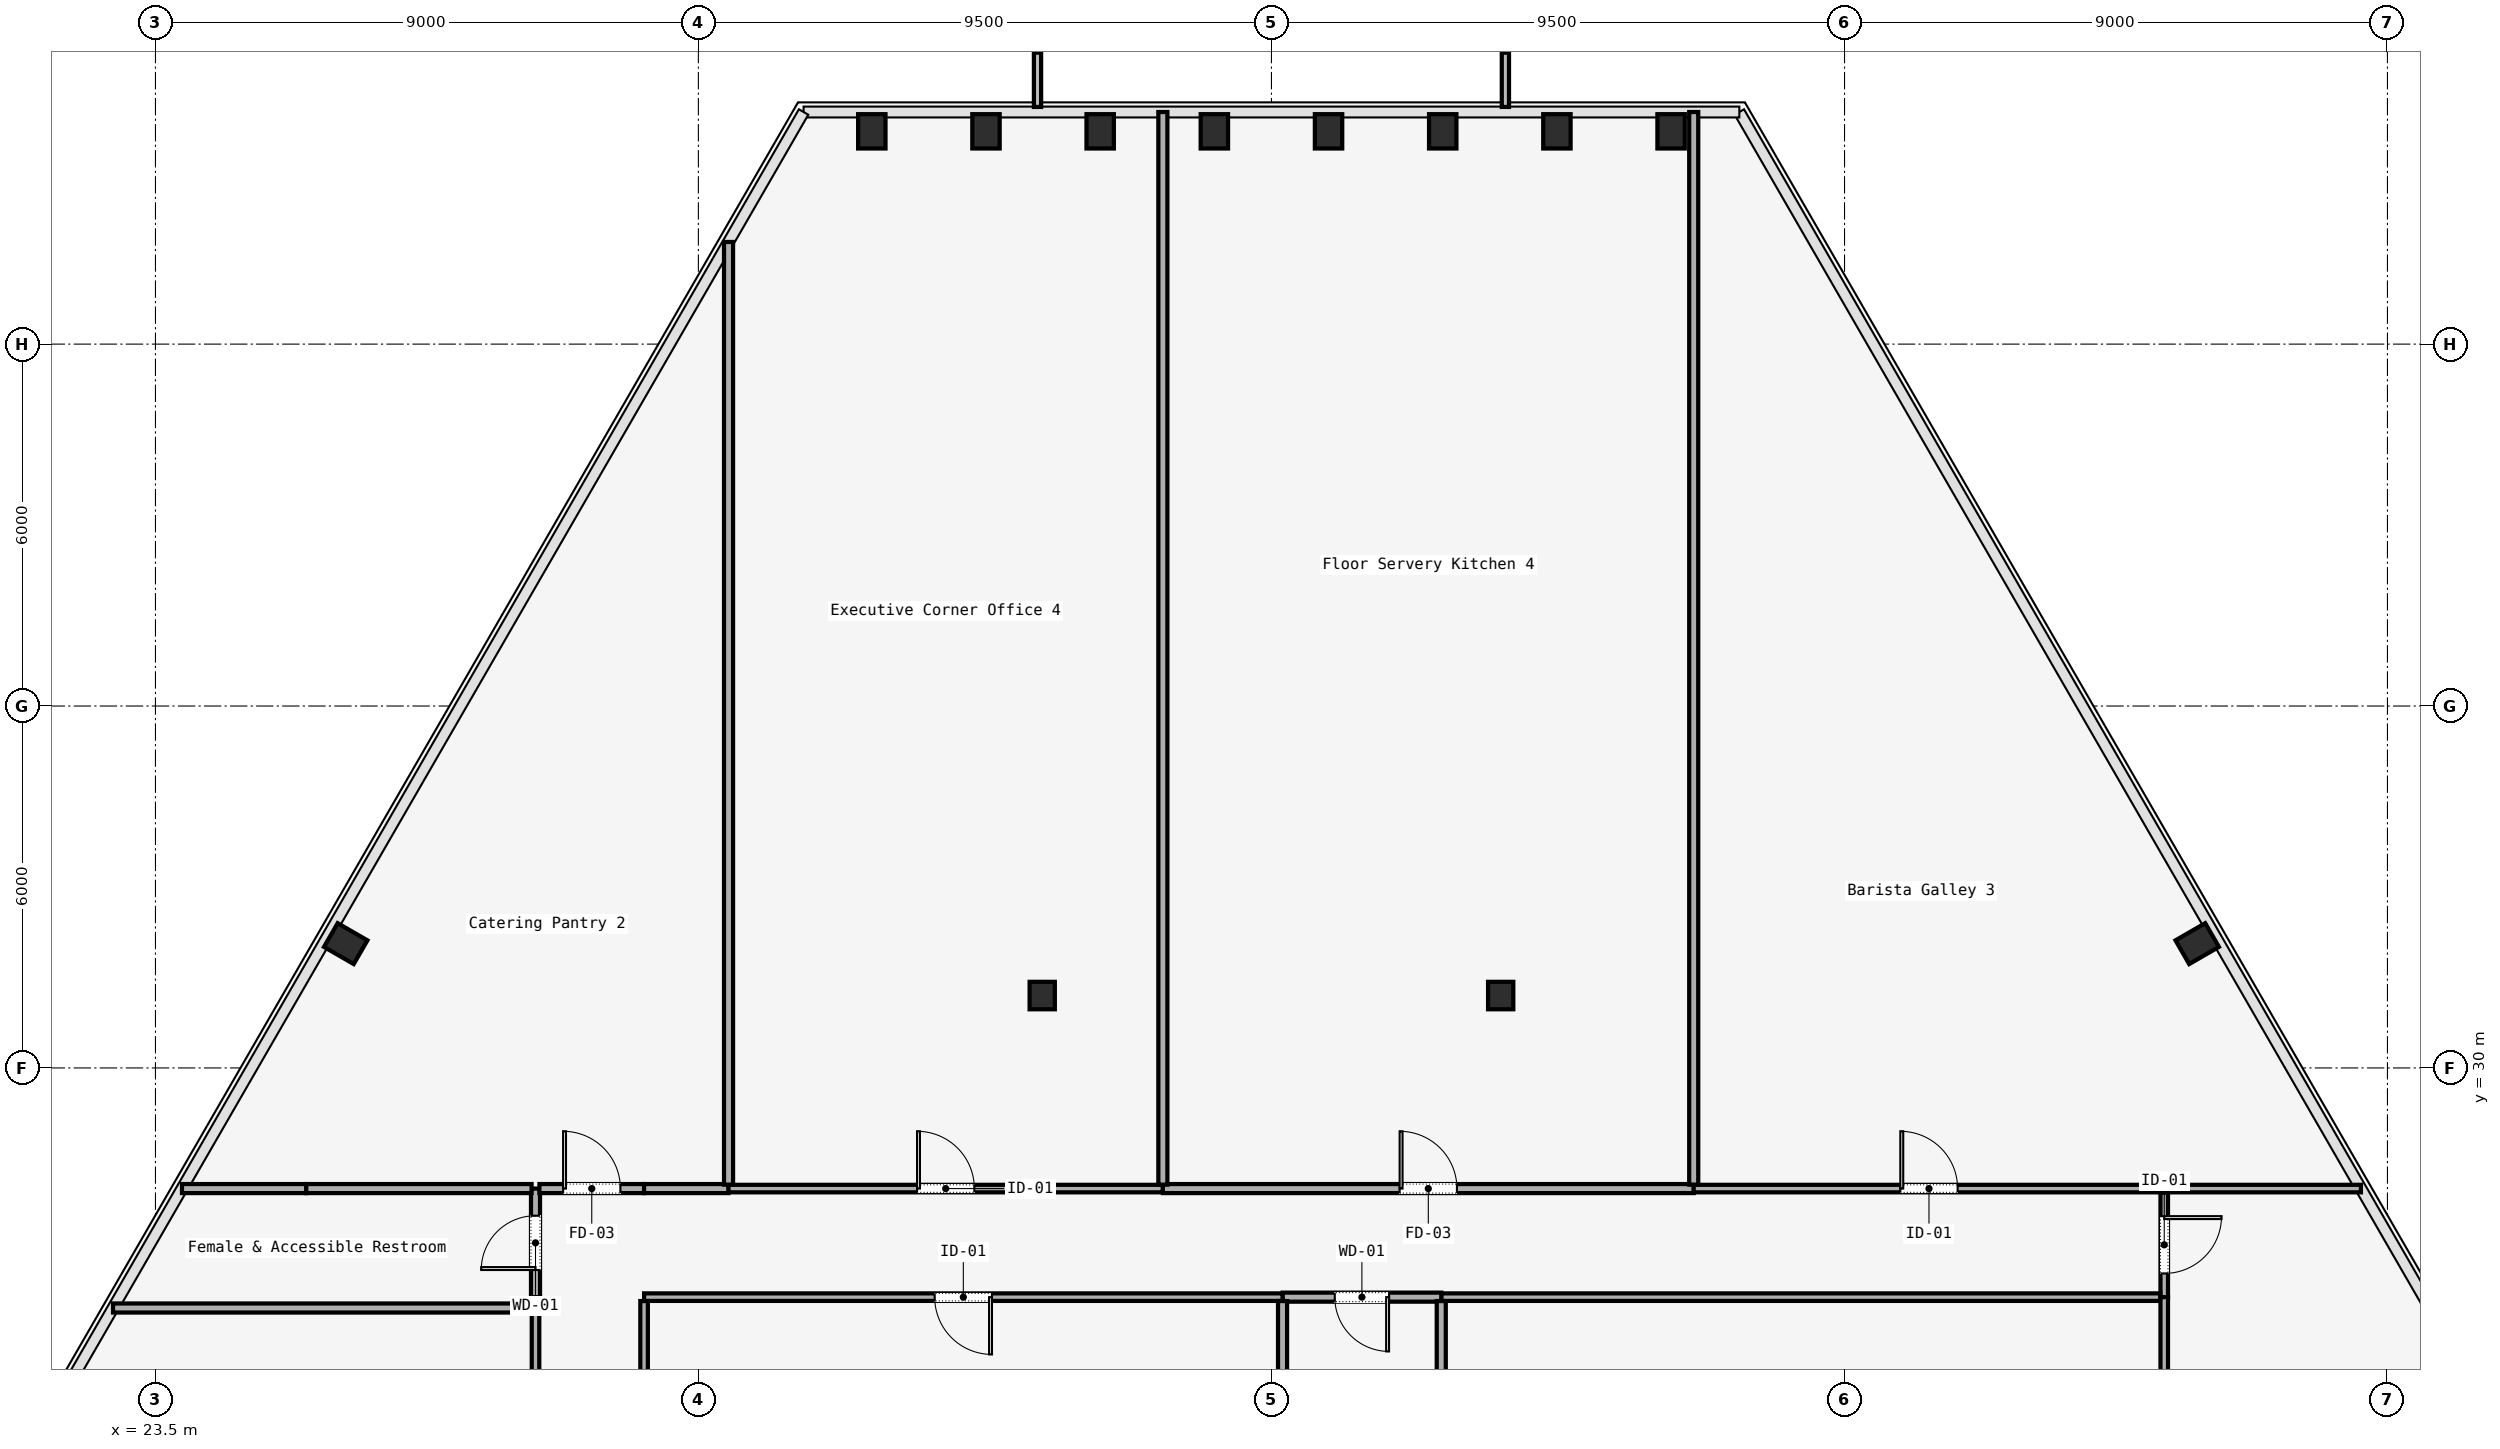
"""IFC4 building model, lengths in metres.
Left out: names, types, materials, properties, quantities, classifications, styles, units other than length and angle.
Written with IfcOpenShell. Run it as: python <this file> out.ifc"""

import sys

from ifc_helpers import new_model, si_unit, direction, frame, frame_2d, origin, origin_2d, place, context, subcontext, project, spatial, rectangle, i_section, extrude, element, fill, save


model = new_model("IFC4")
c1 = context("Model", 3, precision=1e-05, world=origin(), true_north=direction((0.0, 1.0)))
c2 = subcontext(c1, "Body", "Model", "MODEL_VIEW")
j1 = project(units=[si_unit("LENGTHUNIT", "METRE"), si_unit("PLANEANGLEUNIT", "RADIAN")], contexts=[c1])
p1 = place(None, origin())
s1 = spatial("IfcSite", under=j1, at=p1, CompositionType="ELEMENT")
p2 = place(p1, origin())
s2 = spatial("IfcBuilding", under=s1, at=p2, CompositionType="ELEMENT")
p3 = place(p2, frame((0.0, 0.0, 62.6)))
s3 = spatial("IfcBuildingStorey", under=s2, at=p3, CompositionType="ELEMENT", Elevation=62.6)
for number, where, z_axis, x_axis in (
    (1, (38.2, 31.2, 0.0), (0.0, 0.0, 1.0), (1.0, 0.0, 0.0)),
    (2, (45.8, 31.2, 0.0), (0.0, 0.0, 1.0), (1.0, 0.0, 0.0)),
):
    element("IfcColumn", number, at=place(p3, frame(where, z_axis=z_axis, x_axis=x_axis)), inside=s3, PredefinedType="COLUMN", context=c2, shape_type="SweptSolid", body=[
        extrude(i_section(OverallWidth=0.418, OverallDepth=0.456, WebThickness=0.042, FlangeThickness=0.067, FilletRadius=0.015, at=origin_2d()), origin(), (0.0, 0.0, 1.0), 3.58),
    ])
for number, where, z_axis, x_axis in (
    (3, (57.346, 32.061, 0.0), (0.0, 0.0, 1.0), (-0.5, 0.866, 0.0)),
    (4, (48.625, 45.528, 0.0), (0.0, 0.0, 1.0), (1.0, 0.0, 0.0)),
    (5, (46.732, 45.528, 0.0), (0.0, 0.0, 1.0), (1.0, 0.0, 0.0)),
    (6, (44.839, 45.528, 0.0), (0.0, 0.0, 1.0), (1.0, 0.0, 0.0)),
    (7, (42.946, 45.528, 0.0), (0.0, 0.0, 1.0), (1.0, 0.0, 0.0)),
    (8, (41.054, 45.528, 0.0), (0.0, 0.0, 1.0), (1.0, 0.0, 0.0)),
    (9, (39.161, 45.528, 0.0), (0.0, 0.0, 1.0), (1.0, 0.0, 0.0)),
    (10, (37.268, 45.528, 0.0), (0.0, 0.0, 1.0), (1.0, 0.0, 0.0)),
    (11, (35.375, 45.528, 0.0), (0.0, 0.0, 1.0), (1.0, 0.0, 0.0)),
    (12, (26.654, 32.061, 0.0), (0.0, 0.0, 1.0), (0.5, 0.866, 0.0)),
):
    element("IfcColumn", number, at=place(p3, frame(where, z_axis=z_axis, x_axis=x_axis)), inside=s3, PredefinedType="COLUMN", context=c2, shape_type="SweptSolid", body=[
        extrude(i_section(OverallWidth=0.454, OverallDepth=0.569, WebThickness=0.078, FlangeThickness=0.08, FilletRadius=0.015, at=origin_2d()), origin(), (0.0, 0.0, 1.0), 3.58),
    ])
p4 = place(p3, frame((29.8, 17.065, 0.0), z_axis=(0.0, 0.0, 1.0), x_axis=(0.0, 1.0, 0.0)))
e13 = element("IfcWall", 13, at=p4, inside=s3, PredefinedType="PARTITIONING", context=c2, shape_type="SweptSolid", body=[
    extrude(rectangle(XDim=8.955, YDim=0.125, at=frame_2d((4.478, 0.0))), origin(), (0.0, 0.0, 1.0), 2.933),
])
p5 = place(p4, frame((3.778, 0.0, 0.0)))
e14 = element("IfcOpeningElement", 14, at=p5, cuts=e13, PredefinedType="OPENING", context=c2, shape_type="SweptSolid", body=[
    extrude(rectangle(XDim=1.4, YDim=2.2, at=frame_2d((0.7, 1.1))), frame((0.0, 0.062, 0.0), z_axis=(0.0, -1.0, 0.0), x_axis=(1.0, 0.0, 0.0)), (0.0, 0.0, 1.0), 0.125),
])
p6 = place(p3, frame((29.8, 26.2, 0.0), z_axis=(0.0, 0.0, 1.0), x_axis=(0.0, 1.0, 0.0)))
e15 = element("IfcWall", 15, at=p6, inside=s3, PredefinedType="PARTITIONING", context=c2, shape_type="SweptSolid", body=[
    extrude(rectangle(XDim=1.8, YDim=0.15, at=frame_2d((0.9, 0.0))), origin(), (0.0, 0.0, 1.0), 2.933),
])
p7 = place(p6, frame((0.45, 0.0, 0.0)))
e16 = element("IfcOpeningElement", 16, at=p7, cuts=e15, PredefinedType="OPENING", context=c2, shape_type="SweptSolid", body=[
    extrude(rectangle(XDim=0.9, YDim=2.15, at=frame_2d((0.45, 1.075))), frame((0.0, 0.075, 0.0), z_axis=(0.0, -1.0, 0.0), x_axis=(1.0, 0.0, 0.0)), (0.0, 0.0, 1.0), 0.15),
])
p8 = place(p3, frame((29.865, 28.0, 0.0), z_axis=(0.0, 0.0, 1.0), x_axis=(1.0, 0.0, 0.0)))
e17 = element("IfcWall", 17, at=p8, inside=s3, PredefinedType="PARTITIONING", context=c2, shape_type="SweptSolid", body=[
    extrude(rectangle(XDim=1.735, YDim=0.15, at=frame_2d((0.868, 0.0))), origin(), (0.0, 0.0, 1.0), 2.933),
])
p9 = place(p8, frame((0.393, 0.0, 0.0)))
e18 = element("IfcOpeningElement", 18, at=p9, cuts=e17, PredefinedType="OPENING", context=c2, shape_type="SweptSolid", body=[
    extrude(rectangle(XDim=0.95, YDim=2.2, at=frame_2d((0.475, 1.1))), frame((0.0, 0.075, 0.0), z_axis=(0.0, -1.0, 0.0), x_axis=(1.0, 0.0, 0.0)), (0.0, 0.0, 1.0), 0.15),
])
p10 = place(p3, frame((31.6, 28.0, 0.0), z_axis=(0.0, 0.0, 1.0), x_axis=(1.0, 0.0, 0.0)))
e19 = element("IfcWall", 19, at=p10, inside=s3, PredefinedType="PARTITIONING", context=c2, shape_type="SweptSolid", body=[
    extrude(rectangle(XDim=1.4, YDim=0.15, at=frame_2d((0.7, 0.0))), origin(), (0.0, 0.0, 1.0), 2.933),
])
p11 = place(p3, frame((33.0, 28.0, 0.0), z_axis=(0.0, 0.0, 1.0), x_axis=(1.0, 0.0, 0.0)))
e20 = element("IfcWall", 20, at=p11, inside=s3, PredefinedType="PARTITIONING", context=c2, shape_type="SweptSolid", body=[
    extrude(rectangle(XDim=7.2, YDim=0.125, at=frame_2d((3.6, 0.0))), origin(), (0.0, 0.0, 1.0), 2.933),
])
p12 = place(p11, frame((3.125, 0.0, 0.0)))
e21 = element("IfcOpeningElement", 21, at=p12, cuts=e20, PredefinedType="OPENING", context=c2, shape_type="SweptSolid", body=[
    extrude(rectangle(XDim=0.95, YDim=2.2, at=frame_2d((0.475, 1.1))), frame((0.0, 0.062, 0.0), z_axis=(0.0, -1.0, 0.0), x_axis=(1.0, 0.0, 0.0)), (0.0, 0.0, 1.0), 0.125),
])
p13 = place(p3, frame((40.2, 28.0, 0.0), z_axis=(0.0, 0.0, 1.0), x_axis=(1.0, 0.0, 0.0)))
e22 = element("IfcWall", 22, at=p13, inside=s3, PredefinedType="PARTITIONING", context=c2, shape_type="SweptSolid", body=[
    extrude(rectangle(XDim=8.8, YDim=0.15, at=frame_2d((4.4, 0.0))), origin(), (0.0, 0.0, 1.0), 2.933),
])
p14 = place(p13, frame((3.925, 0.0, 0.0)))
e23 = element("IfcOpeningElement", 23, at=p14, cuts=e22, PredefinedType="OPENING", context=c2, shape_type="SweptSolid", body=[
    extrude(rectangle(XDim=0.95, YDim=2.2, at=frame_2d((0.475, 1.1))), frame((0.0, 0.075, 0.0), z_axis=(0.0, -1.0, 0.0), x_axis=(1.0, 0.0, 0.0)), (0.0, 0.0, 1.0), 0.15),
])
p15 = place(p3, frame((49.0, 28.0, 0.0), z_axis=(0.0, 0.0, 1.0), x_axis=(1.0, 0.0, 0.0)))
e24 = element("IfcWall", 24, at=p15, inside=s3, PredefinedType="PARTITIONING", context=c2, shape_type="SweptSolid", body=[
    extrude(rectangle(XDim=7.8, YDim=0.125, at=frame_2d((3.9, 0.0))), origin(), (0.0, 0.0, 1.0), 2.933),
])
p16 = place(p15, frame((3.425, 0.0, 0.0)))
e25 = element("IfcOpeningElement", 25, at=p16, cuts=e24, PredefinedType="OPENING", context=c2, shape_type="SweptSolid", body=[
    extrude(rectangle(XDim=0.95, YDim=2.2, at=frame_2d((0.475, 1.1))), frame((0.0, 0.062, 0.0), z_axis=(0.0, -1.0, 0.0), x_axis=(1.0, 0.0, 0.0)), (0.0, 0.0, 1.0), 0.125),
])
p17 = place(p3, frame((56.8, 27.935, 0.0), z_axis=(0.0, 0.0, 1.0), x_axis=(0.0, -1.0, 0.0)))
e26 = element("IfcWall", 26, at=p17, inside=s3, PredefinedType="PARTITIONING", context=c2, shape_type="SweptSolid", body=[
    extrude(rectangle(XDim=1.735, YDim=0.125, at=frame_2d((0.868, 0.0))), origin(), (0.0, 0.0, 1.0), 2.933),
])
p18 = place(p17, frame((0.393, 0.0, 0.0)))
e27 = element("IfcOpeningElement", 27, at=p18, cuts=e26, PredefinedType="OPENING", context=c2, shape_type="SweptSolid", body=[
    extrude(rectangle(XDim=0.95, YDim=2.2, at=frame_2d((0.475, 1.1))), frame((0.0, 0.062, 0.0), z_axis=(0.0, -1.0, 0.0), x_axis=(1.0, 0.0, 0.0)), (0.0, 0.0, 1.0), 0.125),
])
p19 = place(p3, frame((56.735, 26.2, 0.0), z_axis=(0.0, 0.0, 1.0), x_axis=(-1.0, 0.0, 0.0)))
e28 = element("IfcWall", 28, at=p19, inside=s3, PredefinedType="PARTITIONING", context=c2, shape_type="SweptSolid", body=[
    extrude(rectangle(XDim=11.92, YDim=0.125, at=frame_2d((5.96, 0.0))), origin(), (0.0, 0.0, 1.0), 2.933),
])
p20 = place(p3, frame((44.815, 26.2, 0.0), z_axis=(0.0, 0.0, 1.0), x_axis=(-1.0, 0.0, 0.0)))
e29 = element("IfcWall", 29, at=p20, inside=s3, PredefinedType="PARTITIONING", context=c2, shape_type="SweptSolid", body=[
    extrude(rectangle(XDim=2.631, YDim=0.15, at=frame_2d((1.315, 0.0))), origin(), (0.0, 0.0, 1.0), 2.933),
])
p21 = place(p20, frame((0.865, 0.0, 0.0)))
e30 = element("IfcOpeningElement", 30, at=p21, cuts=e29, PredefinedType="OPENING", context=c2, shape_type="SweptSolid", body=[
    extrude(rectangle(XDim=0.9, YDim=2.15, at=frame_2d((0.45, 1.075))), frame((0.0, 0.075, 0.0), z_axis=(0.0, -1.0, 0.0), x_axis=(1.0, 0.0, 0.0)), (0.0, 0.0, 1.0), 0.15),
])
p22 = place(p3, frame((42.184, 26.2, 0.0), z_axis=(0.0, 0.0, 1.0), x_axis=(-1.0, 0.0, 0.0)))
e31 = element("IfcWall", 31, at=p22, inside=s3, PredefinedType="PARTITIONING", context=c2, shape_type="SweptSolid", body=[
    extrude(rectangle(XDim=10.584, YDim=0.125, at=frame_2d((5.292, 0.0))), origin(), (0.0, 0.0, 1.0), 2.933),
])
p23 = place(p22, frame((4.817, 0.0, 0.0)))
e32 = element("IfcOpeningElement", 32, at=p23, cuts=e31, PredefinedType="OPENING", context=c2, shape_type="SweptSolid", body=[
    extrude(rectangle(XDim=0.95, YDim=2.2, at=frame_2d((0.475, 1.1))), frame((0.0, 0.062, 0.0), z_axis=(0.0, -1.0, 0.0), x_axis=(1.0, 0.0, 0.0)), (0.0, 0.0, 1.0), 0.125),
])
p24 = place(p3, frame((31.6, 26.135, 0.0), z_axis=(0.0, 0.0, 1.0), x_axis=(0.0, -1.0, 0.0)))
e33 = element("IfcWall", 33, at=p24, inside=s3, PredefinedType="PARTITIONING", context=c2, shape_type="SweptSolid", body=[
    extrude(rectangle(XDim=9.135, YDim=0.125, at=frame_2d((4.567, 0.0))), origin(), (0.0, 0.0, 1.0), 2.933),
])
p25 = place(p3, frame((22.796, 26.02, 0.0), z_axis=(0.0, 0.0, 1.0), x_axis=(1.0, 0.0, 0.0)))
e34 = element("IfcWall", 34, at=p25, inside=s3, PredefinedType="PARTITIONING", context=c2, shape_type="SweptSolid", body=[
    extrude(rectangle(XDim=6.939, YDim=0.15, at=frame_2d((3.469, 0.0))), origin(), (0.0, 0.0, 1.0), 2.933),
])
for number, where, z_axis, x_axis in (
    (35, (42.184, 26.135, 0.0), (0.0, 0.0, 1.0), (0.0, -1.0, 0.0)),
    (36, (44.815, 26.135, 0.0), (0.0, 0.0, 1.0), (0.0, -1.0, 0.0)),
):
    element("IfcWall", number, at=place(p3, frame(where, z_axis=z_axis, x_axis=x_axis)), inside=s3, PredefinedType="PARTITIONING", context=c2, shape_type="SweptSolid", body=[
        extrude(rectangle(XDim=9.07, YDim=0.15, at=frame_2d((4.535, 0.0))), origin(), (0.0, 0.0, 1.0), 2.933),
    ])
p26 = place(p3, frame((56.8, 26.2, 0.0), z_axis=(0.0, 0.0, 1.0), x_axis=(0.0, -1.0, 0.0)))
e37 = element("IfcWall", 37, at=p26, inside=s3, PredefinedType="PARTITIONING", context=c2, shape_type="SweptSolid", body=[
    extrude(rectangle(XDim=9.135, YDim=0.125, at=frame_2d((4.567, 0.0))), origin(), (0.0, 0.0, 1.0), 2.933),
])
p27 = place(p3, frame((56.8, 28.0, 0.0), z_axis=(0.0, 0.0, 1.0), x_axis=(1.0, 0.0, 0.0)))
e38 = element("IfcWall", 38, at=p27, inside=s3, PredefinedType="PARTITIONING", context=c2, shape_type="SweptSolid", body=[
    extrude(rectangle(XDim=3.26, YDim=0.125, at=frame_2d((1.63, 0.0))), origin(), (0.0, 0.0, 1.0), 2.933),
])
p28 = place(p3, frame((23.939, 28.0, 0.0), z_axis=(0.0, 0.0, 1.0), x_axis=(1.0, 0.0, 0.0)))
e39 = element("IfcWall", 39, at=p28, inside=s3, PredefinedType="PARTITIONING", context=c2, shape_type="SweptSolid", body=[
    extrude(rectangle(XDim=2.061, YDim=0.15, at=frame_2d((1.03, 0.0))), origin(), (0.0, 0.0, 1.0), 2.933),
])
p29 = place(p3, frame((26.0, 28.0, 0.0), z_axis=(0.0, 0.0, 1.0), x_axis=(1.0, 0.0, 0.0)))
e40 = element("IfcWall", 40, at=p29, inside=s3, PredefinedType="PARTITIONING", context=c2, shape_type="SweptSolid", body=[
    extrude(rectangle(XDim=3.735, YDim=0.15, at=frame_2d((1.868, 0.0))), origin(), (0.0, 0.0, 1.0), 2.933),
])
p30 = place(p3, frame((33.0, 43.693, 0.0), z_axis=(0.0, 0.0, 1.0), x_axis=(0.0, -1.0, 0.0)))
e41 = element("IfcWall", 41, at=p30, inside=s3, PredefinedType="PARTITIONING", context=c2, shape_type="SweptSolid", body=[
    extrude(rectangle(XDim=15.628, YDim=0.15, at=frame_2d((7.814, 0.0))), origin(), (0.0, 0.0, 1.0), 2.933),
])
for number, where, z_axis, x_axis in (
    (42, (49.0, 28.065, 0.0), (0.0, 0.0, 1.0), (0.0, 1.0, 0.0)),
    (43, (40.2, 45.848, 0.0), (0.0, 0.0, 1.0), (0.0, -1.0, 0.0)),
):
    element("IfcWall", number, at=place(p3, frame(where, z_axis=z_axis, x_axis=x_axis)), inside=s3, PredefinedType="PARTITIONING", context=c2, shape_type="SweptSolid", body=[
        extrude(rectangle(XDim=17.783, YDim=0.15, at=frame_2d((8.892, 0.0))), origin(), (0.0, 0.0, 1.0), 2.933),
    ])
p31 = place(p23, origin())
e44 = element("IfcDoor", 44, at=p31, inside=s3, OperationType="SINGLE_SWING_LEFT", PredefinedType="DOOR", context=c2, shape_type="SweptSolid", body=[
    extrude(rectangle(XDim=0.95, YDim=2.2, at=frame_2d((0.475, 1.1))), frame((0.0, 0.025, 0.0), z_axis=(0.0, -1.0, 0.0), x_axis=(1.0, 0.0, 0.0)), (0.0, 0.0, 1.0), 0.05),
])
fill(e32, e44)
p32 = place(p21, origin())
e45 = element("IfcDoor", 45, at=p32, inside=s3, OperationType="SINGLE_SWING_RIGHT", PredefinedType="DOOR", context=c2, shape_type="SweptSolid", body=[
    extrude(rectangle(XDim=0.9, YDim=2.15, at=frame_2d((0.45, 1.075))), frame((0.0, 0.025, 0.0), z_axis=(0.0, -1.0, 0.0), x_axis=(1.0, 0.0, 0.0)), (0.0, 0.0, 1.0), 0.05),
])
fill(e30, e45)
p33 = place(p18, origin())
e46 = element("IfcDoor", 46, at=p33, inside=s3, OperationType="SINGLE_SWING_RIGHT", PredefinedType="DOOR", context=c2, shape_type="SweptSolid", body=[
    extrude(rectangle(XDim=0.95, YDim=2.2, at=frame_2d((0.475, 1.1))), frame((0.0, 0.025, 0.0), z_axis=(0.0, -1.0, 0.0), x_axis=(1.0, 0.0, 0.0)), (0.0, 0.0, 1.0), 0.05),
])
fill(e27, e46)
p34 = place(p7, origin())
e47 = element("IfcDoor", 47, at=p34, inside=s3, OperationType="SINGLE_SWING_LEFT", PredefinedType="DOOR", context=c2, shape_type="SweptSolid", body=[
    extrude(rectangle(XDim=0.9, YDim=2.15, at=frame_2d((0.45, 1.075))), frame((0.0, 0.025, 0.0), z_axis=(0.0, -1.0, 0.0), x_axis=(1.0, 0.0, 0.0)), (0.0, 0.0, 1.0), 0.05),
])
fill(e16, e47)
p35 = place(p9, origin())
e48 = element("IfcDoor", 48, at=p35, inside=s3, OperationType="SINGLE_SWING_RIGHT", PredefinedType="DOOR", context=c2, shape_type="SweptSolid", body=[
    extrude(rectangle(XDim=0.95, YDim=2.2, at=frame_2d((0.475, 1.1))), frame((0.0, 0.025, 0.0), z_axis=(0.0, -1.0, 0.0), x_axis=(1.0, 0.0, 0.0)), (0.0, 0.0, 1.0), 0.05),
])
fill(e18, e48)
p36 = place(p16, origin())
e49 = element("IfcDoor", 49, at=p36, inside=s3, OperationType="SINGLE_SWING_LEFT", PredefinedType="DOOR", context=c2, shape_type="SweptSolid", body=[
    extrude(rectangle(XDim=0.95, YDim=2.2, at=frame_2d((0.475, 1.1))), frame((0.0, 0.025, 0.0), z_axis=(0.0, -1.0, 0.0), x_axis=(1.0, 0.0, 0.0)), (0.0, 0.0, 1.0), 0.05),
])
fill(e25, e49)
p37 = place(p12, origin())
e50 = element("IfcDoor", 50, at=p37, inside=s3, OperationType="SINGLE_SWING_RIGHT", PredefinedType="DOOR", context=c2, shape_type="SweptSolid", body=[
    extrude(rectangle(XDim=0.95, YDim=2.2, at=frame_2d((0.475, 1.1))), frame((0.0, 0.025, 0.0), z_axis=(0.0, -1.0, 0.0), x_axis=(1.0, 0.0, 0.0)), (0.0, 0.0, 1.0), 0.05),
])
fill(e21, e50)
p38 = place(p14, origin())
e51 = element("IfcDoor", 51, at=p38, inside=s3, OperationType="SINGLE_SWING_LEFT", PredefinedType="DOOR", context=c2, shape_type="SweptSolid", body=[
    extrude(rectangle(XDim=0.95, YDim=2.2, at=frame_2d((0.475, 1.1))), frame((0.0, 0.025, 0.0), z_axis=(0.0, -1.0, 0.0), x_axis=(1.0, 0.0, 0.0)), (0.0, 0.0, 1.0), 0.05),
])
fill(e23, e51)
save(model, sys.argv[1])
